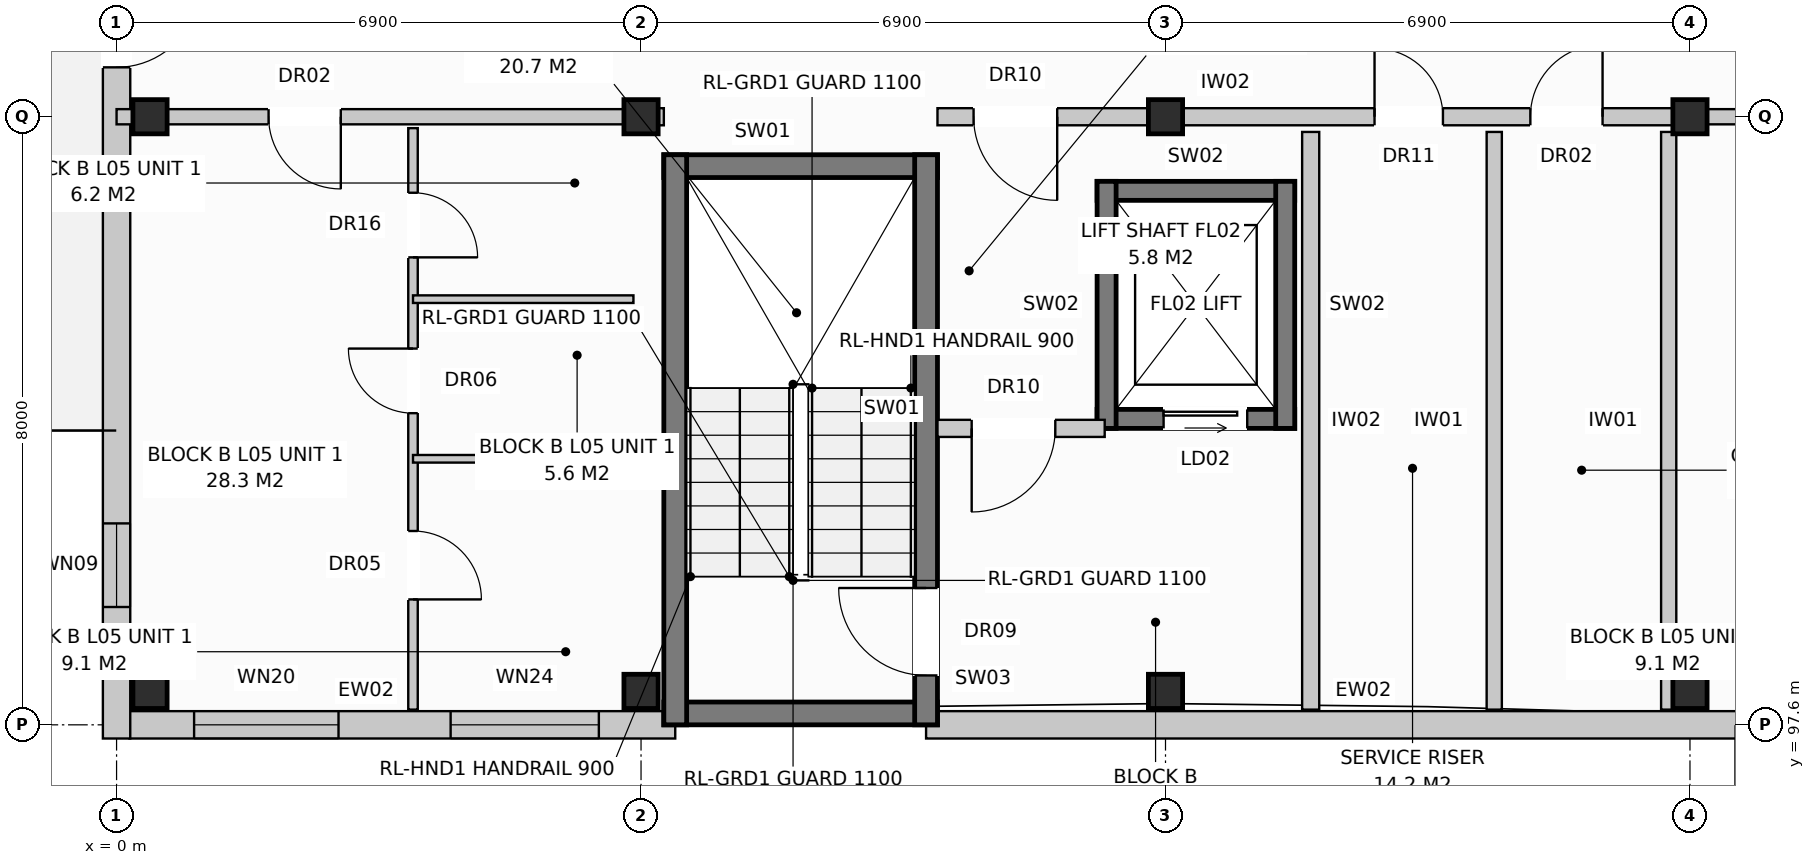
"""IFC4 building model, lengths in metres.
Left out: names, types, materials, properties, quantities, classifications, styles, units other than length and angle.
Written with IfcOpenShell. Run it as: python <this file> out.ifc"""

import sys

from ifc_helpers import new_model, si_unit, direction, frame, frame_2d, origin, origin_with_axes, origin_2d, place, context, subcontext, project, spatial, rectangle, extrude, element, fill, save


model = new_model("IFC4")
c1 = context("Model", 3, precision=1e-05, world=origin(), true_north=direction((0.0, 1.0)))
c2 = subcontext(c1, "Body", "Model", "MODEL_VIEW")
j1 = project(units=[si_unit("LENGTHUNIT", "METRE"), si_unit("PLANEANGLEUNIT", "RADIAN")], contexts=[c1])
p1 = place(None, origin())
s1 = spatial("IfcSite", under=j1, at=p1, CompositionType="ELEMENT")
p2 = place(p1, origin())
s2 = spatial("IfcBuilding", under=s1, at=p2, CompositionType="ELEMENT")
p3 = place(p2, frame((0.0, 0.0, 17.6)))
s3 = spatial("IfcBuildingStorey", under=s2, at=p3, CompositionType="ELEMENT", Elevation=17.6)
for number, where, z_axis, x_axis in (
    (1, (0.44, 98.04, 0.0), (0.0, 0.0, 1.0), (1.0, 0.0, 0.0)),
    (2, (0.44, 105.6, 0.0), (0.0, 0.0, 1.0), (1.0, 0.0, 0.0)),
    (3, (6.9, 98.04, 0.0), (0.0, 0.0, 1.0), (1.0, 0.0, 0.0)),
    (4, (6.9, 105.6, 0.0), (0.0, 0.0, 1.0), (1.0, 0.0, 0.0)),
    (5, (13.8, 98.04, 0.0), (0.0, 0.0, 1.0), (1.0, 0.0, 0.0)),
    (6, (13.8, 105.6, 0.0), (0.0, 0.0, 1.0), (1.0, 0.0, 0.0)),
    (7, (20.7, 98.04, 0.0), (0.0, 0.0, 1.0), (1.0, 0.0, 0.0)),
    (8, (20.7, 105.6, 0.0), (0.0, 0.0, 1.0), (1.0, 0.0, 0.0)),
):
    element("IfcColumn", number, at=place(p3, frame(where, z_axis=z_axis, x_axis=x_axis)), inside=s3, PredefinedType="COLUMN", context=c2, shape_type="SweptSolid", body=[
        extrude(rectangle(XDim=0.45, YDim=0.45, at=origin_2d()), origin(), (0.0, 0.0, 1.0), 3.2),
    ])
p4 = place(p3, frame((0.17, 97.6, 0.0), z_axis=(0.0, 0.0, 1.0), x_axis=(1.0, 0.0, 0.0)))
e9 = element("IfcWall", 9, at=p4, inside=s3, PredefinedType="STANDARD", context=c2, shape_type="SweptSolid", body=[
    extrude(rectangle(XDim=7.18, YDim=0.36, at=frame_2d((3.59, 0.0))), origin(), (0.0, 0.0, 1.0), 2.95),
])
p5 = place(p4, frame((0.85, 0.0, 0.8)))
e10 = element("IfcOpeningElement", 10, at=p5, cuts=e9, PredefinedType="OPENING", context=c2, shape_type="SweptSolid", body=[
    extrude(rectangle(XDim=1.9, YDim=1.85, at=frame_2d((0.95, 0.925))), frame((0.0, 0.192, 0.0), z_axis=(0.0, -1.0, 0.0), x_axis=(1.0, 0.0, 0.0)), (0.0, 0.0, 1.0), 0.384),
])
p6 = place(p4, frame((4.225, 0.0, 0.8)))
e11 = element("IfcOpeningElement", 11, at=p6, cuts=e9, PredefinedType="OPENING", context=c2, shape_type="SweptSolid", body=[
    extrude(rectangle(XDim=1.95, YDim=1.65, at=frame_2d((0.975, 0.825))), frame((0.0, 0.192, 0.0), z_axis=(0.0, -1.0, 0.0), x_axis=(1.0, 0.0, 0.0)), (0.0, 0.0, 1.0), 0.384),
])
p7 = place(p3, frame((10.65, 97.6, 0.0), z_axis=(0.0, 0.0, 1.0), x_axis=(1.0, 0.0, 0.0)))
e12 = element("IfcWall", 12, at=p7, inside=s3, PredefinedType="STANDARD", context=c2, shape_type="SweptSolid", body=[
    extrude(rectangle(XDim=17.4, YDim=0.36, at=frame_2d((8.7, 0.0))), origin(), (0.0, 0.0, 1.0), 2.95),
])
p8 = place(p7, frame((11.82, 0.0, 0.0)))
e13 = element("IfcOpeningElement", 13, at=p8, cuts=e12, PredefinedType="OPENING", context=c2, shape_type="SweptSolid", body=[
    extrude(rectangle(XDim=1.05, YDim=2.12, at=frame_2d((0.525, 1.06))), frame((0.0, 0.192, 0.0), z_axis=(0.0, -1.0, 0.0), x_axis=(1.0, 0.0, 0.0)), (0.0, 0.0, 1.0), 0.384),
])
p9 = place(p7, frame((14.87, 0.0, 0.72)))
e14 = element("IfcOpeningElement", 14, at=p9, cuts=e12, PredefinedType="OPENING", context=c2, shape_type="SweptSolid", body=[
    extrude(rectangle(XDim=1.1, YDim=1.5, at=frame_2d((0.55, 0.75))), frame((0.0, 0.192, 0.0), z_axis=(0.0, -1.0, 0.0), x_axis=(1.0, 0.0, 0.0)), (0.0, 0.0, 1.0), 0.384),
])
p10 = place(p3, frame((0.0, 97.42, 0.0), z_axis=(0.0, 0.0, 1.0), x_axis=(0.0, 1.0, 0.0)))
e15 = element("IfcWall", 15, at=p10, inside=s3, PredefinedType="STANDARD", context=c2, shape_type="SweptSolid", body=[
    extrude(rectangle(XDim=18.76, YDim=0.36, at=frame_2d((9.38, 0.0))), origin(), (0.0, 0.0, 1.0), 2.95),
])
p11 = place(p10, frame((8.83, 0.0, 0.0)))
e16 = element("IfcOpeningElement", 16, at=p11, cuts=e15, PredefinedType="OPENING", context=c2, shape_type="SweptSolid", body=[
    extrude(rectangle(XDim=1.1, YDim=2.1, at=frame_2d((0.55, 1.05))), frame((0.0, 0.192, 0.0), z_axis=(0.0, -1.0, 0.0), x_axis=(1.0, 0.0, 0.0)), (0.0, 0.0, 1.0), 0.384),
])
p12 = place(p10, frame((1.73, 0.0, 0.72)))
e17 = element("IfcOpeningElement", 17, at=p12, cuts=e15, PredefinedType="OPENING", context=c2, shape_type="SweptSolid", body=[
    extrude(rectangle(XDim=1.1, YDim=1.5, at=frame_2d((0.55, 0.75))), frame((0.0, 0.192, 0.0), z_axis=(0.0, -1.0, 0.0), x_axis=(1.0, 0.0, 0.0)), (0.0, 0.0, 1.0), 0.384),
])
p13 = place(p10, frame((15.93, 0.0, 0.72)))
e18 = element("IfcOpeningElement", 18, at=p13, cuts=e15, PredefinedType="OPENING", context=c2, shape_type="SweptSolid", body=[
    extrude(rectangle(XDim=1.1, YDim=1.5, at=frame_2d((0.55, 0.75))), frame((0.0, 0.192, 0.0), z_axis=(0.0, -1.0, 0.0), x_axis=(1.0, 0.0, 0.0)), (0.0, 0.0, 1.0), 0.384),
])
for number, where, z_axis, x_axis in (
    (19, (7.2, 97.75, 0.0), (0.0, 0.0, 1.0), (1.0, 0.0, 0.0)),
    (20, (7.2, 104.95, 0.0), (0.0, 0.0, 1.0), (1.0, 0.0, 0.0)),
):
    element("IfcWall", number, at=place(p3, frame(where, z_axis=z_axis, x_axis=x_axis)), inside=s3, PredefinedType="SHEAR", context=c2, shape_type="SweptSolid", body=[
        extrude(rectangle(XDim=3.6, YDim=0.3, at=frame_2d((1.8, 0.0))), origin(), (0.0, 0.0, 1.0), 2.95),
    ])
p14 = place(p3, frame((7.35, 97.6, 0.0), z_axis=(0.0, 0.0, 1.0), x_axis=(0.0, 1.0, 0.0)))
e21 = element("IfcWall", 21, at=p14, inside=s3, PredefinedType="SHEAR", context=c2, shape_type="SweptSolid", body=[
    extrude(rectangle(XDim=7.5, YDim=0.3, at=frame_2d((3.75, 0.0))), origin(), (0.0, 0.0, 1.0), 2.95),
])
p15 = place(p3, frame((10.65, 97.6, 0.0), z_axis=(0.0, 0.0, 1.0), x_axis=(0.0, 1.0, 0.0)))
e22 = element("IfcWall", 22, at=p15, inside=s3, PredefinedType="SHEAR", context=c2, shape_type="SweptSolid", body=[
    extrude(rectangle(XDim=7.5, YDim=0.3, at=frame_2d((3.75, 0.0))), origin(), (0.0, 0.0, 1.0), 2.95),
])
p16 = place(p15, frame((0.65, 0.0, 0.0)))
e23 = element("IfcOpeningElement", 23, at=p16, cuts=e22, PredefinedType="OPENING", context=c2, shape_type="SweptSolid", body=[
    extrude(rectangle(XDim=1.15, YDim=2.15, at=frame_2d((0.575, 1.075))), frame((0.0, 0.162, 0.0), z_axis=(0.0, -1.0, 0.0), x_axis=(1.0, 0.0, 0.0)), (0.0, 0.0, 1.0), 0.324),
])
p17 = place(p3, frame((12.9, 101.625, 0.0), z_axis=(0.0, 0.0, 1.0), x_axis=(1.0, 0.0, 0.0)))
e24 = element("IfcWall", 24, at=p17, inside=s3, PredefinedType="SHEAR", context=c2, shape_type="SweptSolid", body=[
    extrude(rectangle(XDim=2.6, YDim=0.25, at=frame_2d((1.3, 0.0))), origin(), (0.0, 0.0, 1.0), 2.95),
])
p18 = place(p17, frame((0.875, 0.0, 0.0)))
e25 = element("IfcOpeningElement", 25, at=p18, cuts=e24, PredefinedType="OPENING", context=c2, shape_type="SweptSolid", body=[
    extrude(rectangle(XDim=1.1, YDim=2.1, at=frame_2d((0.55, 1.05))), frame((0.0, 0.137, 0.0), z_axis=(0.0, -1.0, 0.0), x_axis=(1.0, 0.0, 0.0)), (0.0, 0.0, 1.0), 0.274),
])
p19 = place(p3, frame((12.9, 104.625, 0.0), z_axis=(0.0, 0.0, 1.0), x_axis=(1.0, 0.0, 0.0)))
e26 = element("IfcWall", 26, at=p19, inside=s3, PredefinedType="SHEAR", context=c2, shape_type="SweptSolid", body=[
    extrude(rectangle(XDim=2.6, YDim=0.25, at=frame_2d((1.3, 0.0))), origin(), (0.0, 0.0, 1.0), 2.95),
])
for number, where, z_axis, x_axis in (
    (27, (13.025, 101.5, 0.0), (0.0, 0.0, 1.0), (0.0, 1.0, 0.0)),
    (28, (15.375, 101.5, 0.0), (0.0, 0.0, 1.0), (0.0, 1.0, 0.0)),
):
    element("IfcWall", number, at=place(p3, frame(where, z_axis=z_axis, x_axis=x_axis)), inside=s3, PredefinedType="SHEAR", context=c2, shape_type="SweptSolid", body=[
        extrude(rectangle(XDim=3.25, YDim=0.25, at=frame_2d((1.625, 0.0))), origin(), (0.0, 0.0, 1.0), 2.95),
    ])
p20 = place(p3, frame((15.71, 97.8, 0.0), z_axis=(0.0, 0.0, 1.0), x_axis=(0.0, 1.0, 0.0)))
e29 = element("IfcWall", 29, at=p20, inside=s3, PredefinedType="PARTITIONING", context=c2, shape_type="SweptSolid", body=[
    extrude(rectangle(XDim=7.6, YDim=0.225, at=frame_2d((3.8, 0.0))), origin(), (0.0, 0.0, 1.0), 2.59),
])
p21 = place(p3, frame((10.8, 101.5, 0.0), z_axis=(0.0, 0.0, 1.0), x_axis=(1.0, 0.0, 0.0)))
e30 = element("IfcWall", 30, at=p21, inside=s3, PredefinedType="PARTITIONING", context=c2, shape_type="SweptSolid", body=[
    extrude(rectangle(XDim=2.2, YDim=0.225, at=frame_2d((1.1, 0.0))), origin(), (0.0, 0.0, 1.0), 2.95),
])
p22 = place(p21, frame((0.45, 0.0, 0.0)))
e31 = element("IfcOpeningElement", 31, at=p22, cuts=e30, PredefinedType="OPENING", context=c2, shape_type="SweptSolid", body=[
    extrude(rectangle(XDim=1.1, YDim=2.15, at=frame_2d((0.55, 1.075))), frame((0.0, 0.125, 0.0), z_axis=(0.0, -1.0, 0.0), x_axis=(1.0, 0.0, 0.0)), (0.0, 0.0, 1.0), 0.249),
])
p23 = place(p3, frame((6.9, 105.6, 0.0), z_axis=(0.0, 0.0, 1.0), x_axis=(1.0, 0.0, 0.0)))
e32 = element("IfcWall", 32, at=p23, inside=s3, PredefinedType="PARTITIONING", context=c2, shape_type="SweptSolid", body=[
    extrude(rectangle(XDim=0.3, YDim=0.225, at=frame_2d((0.15, 0.0))), origin(), (0.0, 0.0, 1.0), 2.95),
])
for number, where, z_axis, x_axis in (
    (33, (18.125, 97.8, 0.0), (0.0, 0.0, 1.0), (0.0, 1.0, 0.0)),
    (34, (20.42, 97.8, 0.0), (0.0, 0.0, 1.0), (0.0, 1.0, 0.0)),
):
    element("IfcWall", number, at=place(p3, frame(where, z_axis=z_axis, x_axis=x_axis)), inside=s3, PredefinedType="PARTITIONING", context=c2, shape_type="SweptSolid", body=[
        extrude(rectangle(XDim=7.6, YDim=0.2, at=frame_2d((3.8, 0.0))), origin(), (0.0, 0.0, 1.0), 2.95),
    ])
p24 = place(p3, frame((10.8, 105.6, 0.0), z_axis=(0.0, 0.0, 1.0), x_axis=(1.0, 0.0, 0.0)))
e35 = element("IfcWall", 35, at=p24, inside=s3, PredefinedType="PARTITIONING", context=c2, shape_type="SweptSolid", body=[
    extrude(rectangle(XDim=9.9, YDim=0.225, at=frame_2d((4.95, 0.0))), origin(), (0.0, 0.0, 1.0), 2.39),
])
p25 = place(p24, frame((0.475, 0.0, 0.0)))
e36 = element("IfcOpeningElement", 36, at=p25, cuts=e35, PredefinedType="OPENING", context=c2, shape_type="SweptSolid", body=[
    extrude(rectangle(XDim=1.1, YDim=2.15, at=frame_2d((0.55, 1.075))), frame((0.0, 0.125, 0.0), z_axis=(0.0, -1.0, 0.0), x_axis=(1.0, 0.0, 0.0)), (0.0, 0.0, 1.0), 0.249),
])
p26 = place(p24, frame((5.75, 0.0, 0.0)))
e37 = element("IfcOpeningElement", 37, at=p26, cuts=e35, PredefinedType="OPENING", context=c2, shape_type="SweptSolid", body=[
    extrude(rectangle(XDim=0.9, YDim=2.1, at=frame_2d((0.45, 1.05))), frame((0.0, 0.125, 0.0), z_axis=(0.0, -1.0, 0.0), x_axis=(1.0, 0.0, 0.0)), (0.0, 0.0, 1.0), 0.249),
])
p27 = place(p24, frame((7.8, 0.0, 0.0)))
e38 = element("IfcOpeningElement", 38, at=p27, cuts=e35, PredefinedType="OPENING", context=c2, shape_type="SweptSolid", body=[
    extrude(rectangle(XDim=0.95, YDim=2.15, at=frame_2d((0.475, 1.075))), frame((0.0, 0.125, 0.0), z_axis=(0.0, -1.0, 0.0), x_axis=(1.0, 0.0, 0.0)), (0.0, 0.0, 1.0), 0.249),
])
p28 = place(p3, frame((0.0, 105.6, 0.0), z_axis=(0.0, 0.0, 1.0), x_axis=(1.0, 0.0, 0.0)))
e39 = element("IfcWall", 39, at=p28, inside=s3, PredefinedType="PARTITIONING", context=c2, shape_type="SweptSolid", body=[
    extrude(rectangle(XDim=6.9, YDim=0.2, at=frame_2d((3.45, 0.0))), origin(), (0.0, 0.0, 1.0), 2.39),
])
p29 = place(p28, frame((2.0, 0.0, 0.0)))
e40 = element("IfcOpeningElement", 40, at=p29, cuts=e39, PredefinedType="OPENING", context=c2, shape_type="SweptSolid", body=[
    extrude(rectangle(XDim=0.95, YDim=2.15, at=frame_2d((0.475, 1.075))), frame((0.0, 0.112, 0.0), z_axis=(0.0, -1.0, 0.0), x_axis=(1.0, 0.0, 0.0)), (0.0, 0.0, 1.0), 0.224),
])
p30 = place(p3, frame((3.9, 105.45, 0.0), z_axis=(0.0, 0.0, 1.0), x_axis=(0.0, -1.0, 0.0)))
e41 = element("IfcWall", 41, at=p30, inside=s3, PredefinedType="PARTITIONING", context=c2, shape_type="SweptSolid", body=[
    extrude(rectangle(XDim=7.65, YDim=0.125, at=frame_2d((3.825, 0.0))), origin(), (0.0, 0.0, 1.0), 2.95),
])
p31 = place(p30, frame((0.85, 0.0, 0.0)))
e42 = element("IfcOpeningElement", 42, at=p31, cuts=e41, PredefinedType="OPENING", context=c2, shape_type="SweptSolid", body=[
    extrude(rectangle(XDim=0.85, YDim=2.1, at=frame_2d((0.425, 1.05))), frame((0.0, 0.074, 0.0), z_axis=(0.0, -1.0, 0.0), x_axis=(1.0, 0.0, 0.0)), (0.0, 0.0, 1.0), 0.149),
])
p32 = place(p30, frame((2.9, 0.0, 0.0)))
e43 = element("IfcOpeningElement", 43, at=p32, cuts=e41, PredefinedType="OPENING", context=c2, shape_type="SweptSolid", body=[
    extrude(rectangle(XDim=0.85, YDim=2.05, at=frame_2d((0.425, 1.025))), frame((0.0, 0.074, 0.0), z_axis=(0.0, -1.0, 0.0), x_axis=(1.0, 0.0, 0.0)), (0.0, 0.0, 1.0), 0.149),
])
p33 = place(p30, frame((5.3, 0.0, 0.0)))
e44 = element("IfcOpeningElement", 44, at=p33, cuts=e41, PredefinedType="OPENING", context=c2, shape_type="SweptSolid", body=[
    extrude(rectangle(XDim=0.9, YDim=2.1, at=frame_2d((0.45, 1.05))), frame((0.0, 0.074, 0.0), z_axis=(0.0, -1.0, 0.0), x_axis=(1.0, 0.0, 0.0)), (0.0, 0.0, 1.0), 0.149),
])
for number, where, z_axis, x_axis in (
    (45, (3.9, 103.2, 0.0), (0.0, 0.0, 1.0), (1.0, 0.0, 0.0)),
    (46, (3.9, 101.1, 0.0), (0.0, 0.0, 1.0), (1.0, 0.0, 0.0)),
):
    element("IfcWall", number, at=place(p3, frame(where, z_axis=z_axis, x_axis=x_axis)), inside=s3, PredefinedType="PARTITIONING", context=c2, shape_type="SweptSolid", body=[
        extrude(rectangle(XDim=2.9, YDim=0.1, at=frame_2d((1.45, 0.0))), origin(), (0.0, 0.0, 1.0), 2.95),
    ])
p34 = place(p3, frame((20.7, 105.6, 0.0), z_axis=(0.0, 0.0, 1.0), x_axis=(1.0, 0.0, 0.0)))
e47 = element("IfcWall", 47, at=p34, inside=s3, PredefinedType="PARTITIONING", context=c2, shape_type="SweptSolid", body=[
    extrude(rectangle(XDim=6.9, YDim=0.2, at=frame_2d((3.45, 0.0))), origin(), (0.0, 0.0, 1.0), 2.39),
])
p35 = place(p34, frame((2.0, 0.0, 0.0)))
e48 = element("IfcOpeningElement", 48, at=p35, cuts=e47, PredefinedType="OPENING", context=c2, shape_type="SweptSolid", body=[
    extrude(rectangle(XDim=0.95, YDim=2.15, at=frame_2d((0.475, 1.075))), frame((0.0, 0.112, 0.0), z_axis=(0.0, -1.0, 0.0), x_axis=(1.0, 0.0, 0.0)), (0.0, 0.0, 1.0), 0.224),
])
p36 = place(p5, origin_with_axes())
e49 = element("IfcWindow", 49, at=p36, inside=s3, PartitioningType="SINGLE_PANEL", PredefinedType="WINDOW", context=c2, shape_type="SweptSolid", body=[
    extrude(rectangle(XDim=1.9, YDim=1.85, at=frame_2d((0.95, 0.925))), frame((0.0, 0.03, 0.0), z_axis=(0.0, -1.0, 0.0), x_axis=(1.0, 0.0, 0.0)), (0.0, 0.0, 1.0), 0.06),
])
fill(e10, e49)
p37 = place(p6, origin_with_axes())
e50 = element("IfcWindow", 50, at=p37, inside=s3, PartitioningType="SINGLE_PANEL", PredefinedType="WINDOW", context=c2, shape_type="SweptSolid", body=[
    extrude(rectangle(XDim=1.95, YDim=1.65, at=frame_2d((0.975, 0.825))), frame((0.0, 0.03, 0.0), z_axis=(0.0, -1.0, 0.0), x_axis=(1.0, 0.0, 0.0)), (0.0, 0.0, 1.0), 0.06),
])
fill(e11, e50)
p38 = place(p11, frame((1.1, 0.0, 0.0), z_axis=(0.0, 0.0, 1.0), x_axis=(-1.0, 0.0, 0.0)))
e51 = element("IfcDoor", 51, at=p38, inside=s3, OperationType="SINGLE_SWING_RIGHT", PredefinedType="DOOR", context=c2, shape_type="SweptSolid", body=[
    extrude(rectangle(XDim=1.1, YDim=2.1, at=frame_2d((0.55, 1.05))), frame((0.0, 0.025, 0.0), z_axis=(0.0, -1.0, 0.0), x_axis=(1.0, 0.0, 0.0)), (0.0, 0.0, 1.0), 0.05),
])
fill(e16, e51)
p39 = place(p12, origin_with_axes())
e52 = element("IfcWindow", 52, at=p39, inside=s3, PartitioningType="SINGLE_PANEL", PredefinedType="WINDOW", context=c2, shape_type="SweptSolid", body=[
    extrude(rectangle(XDim=1.1, YDim=1.5, at=frame_2d((0.55, 0.75))), frame((0.0, 0.03, 0.0), z_axis=(0.0, -1.0, 0.0), x_axis=(1.0, 0.0, 0.0)), (0.0, 0.0, 1.0), 0.06),
])
fill(e17, e52)
p40 = place(p16, origin_with_axes())
e53 = element("IfcDoor", 53, at=p40, inside=s3, OperationType="SINGLE_SWING_RIGHT", PredefinedType="DOOR", context=c2, shape_type="SweptSolid", body=[
    extrude(rectangle(XDim=1.15, YDim=2.15, at=frame_2d((0.575, 1.075))), frame((0.0, 0.025, 0.0), z_axis=(0.0, -1.0, 0.0), x_axis=(1.0, 0.0, 0.0)), (0.0, 0.0, 1.0), 0.05),
])
fill(e23, e53)
p41 = place(p18, origin_with_axes())
e54 = element("IfcDoor", 54, at=p41, inside=s3, OperationType="SLIDING_TO_LEFT", PredefinedType="DOOR", context=c2, shape_type="SweptSolid", body=[
    extrude(rectangle(XDim=1.1, YDim=2.1, at=frame_2d((0.55, 1.05))), frame((0.0, 0.025, 0.0), z_axis=(0.0, -1.0, 0.0), x_axis=(1.0, 0.0, 0.0)), (0.0, 0.0, 1.0), 0.05),
])
fill(e25, e54)
p42 = place(p22, frame((1.1, 0.0, 0.0), z_axis=(0.0, 0.0, 1.0), x_axis=(-1.0, 0.0, 0.0)))
e55 = element("IfcDoor", 55, at=p42, inside=s3, OperationType="SINGLE_SWING_LEFT", PredefinedType="DOOR", context=c2, shape_type="SweptSolid", body=[
    extrude(rectangle(XDim=1.1, YDim=2.15, at=frame_2d((0.55, 1.075))), frame((0.0, 0.025, 0.0), z_axis=(0.0, -1.0, 0.0), x_axis=(1.0, 0.0, 0.0)), (0.0, 0.0, 1.0), 0.05),
])
fill(e31, e55)
p43 = place(p25, frame((1.1, 0.0, 0.0), z_axis=(0.0, 0.0, 1.0), x_axis=(-1.0, 0.0, 0.0)))
e56 = element("IfcDoor", 56, at=p43, inside=s3, OperationType="SINGLE_SWING_RIGHT", PredefinedType="DOOR", context=c2, shape_type="SweptSolid", body=[
    extrude(rectangle(XDim=1.1, YDim=2.15, at=frame_2d((0.55, 1.075))), frame((0.0, 0.025, 0.0), z_axis=(0.0, -1.0, 0.0), x_axis=(1.0, 0.0, 0.0)), (0.0, 0.0, 1.0), 0.05),
])
fill(e36, e56)
p44 = place(p26, origin_with_axes())
e57 = element("IfcDoor", 57, at=p44, inside=s3, OperationType="SINGLE_SWING_LEFT", PredefinedType="DOOR", context=c2, shape_type="SweptSolid", body=[
    extrude(rectangle(XDim=0.9, YDim=2.1, at=frame_2d((0.45, 1.05))), frame((0.0, 0.025, 0.0), z_axis=(0.0, -1.0, 0.0), x_axis=(1.0, 0.0, 0.0)), (0.0, 0.0, 1.0), 0.05),
])
fill(e37, e57)
p45 = place(p27, origin_with_axes())
e58 = element("IfcDoor", 58, at=p45, inside=s3, OperationType="SINGLE_SWING_RIGHT", PredefinedType="DOOR", context=c2, shape_type="SweptSolid", body=[
    extrude(rectangle(XDim=0.95, YDim=2.15, at=frame_2d((0.475, 1.075))), frame((0.0, 0.025, 0.0), z_axis=(0.0, -1.0, 0.0), x_axis=(1.0, 0.0, 0.0)), (0.0, 0.0, 1.0), 0.05),
])
fill(e38, e58)
p46 = place(p29, frame((0.95, 0.0, 0.0), z_axis=(0.0, 0.0, 1.0), x_axis=(-1.0, 0.0, 0.0)))
e59 = element("IfcDoor", 59, at=p46, inside=s3, OperationType="SINGLE_SWING_RIGHT", PredefinedType="DOOR", context=c2, shape_type="SweptSolid", body=[
    extrude(rectangle(XDim=0.95, YDim=2.15, at=frame_2d((0.475, 1.075))), frame((0.0, 0.025, 0.0), z_axis=(0.0, -1.0, 0.0), x_axis=(1.0, 0.0, 0.0)), (0.0, 0.0, 1.0), 0.05),
])
fill(e40, e59)
p47 = place(p31, origin_with_axes())
e60 = element("IfcDoor", 60, at=p47, inside=s3, OperationType="SINGLE_SWING_RIGHT", PredefinedType="DOOR", context=c2, shape_type="SweptSolid", body=[
    extrude(rectangle(XDim=0.85, YDim=2.1, at=frame_2d((0.425, 1.05))), frame((0.0, 0.025, 0.0), z_axis=(0.0, -1.0, 0.0), x_axis=(1.0, 0.0, 0.0)), (0.0, 0.0, 1.0), 0.05),
])
fill(e42, e60)
p48 = place(p32, frame((0.85, 0.0, 0.0), z_axis=(0.0, 0.0, 1.0), x_axis=(-1.0, 0.0, 0.0)))
e61 = element("IfcDoor", 61, at=p48, inside=s3, OperationType="SINGLE_SWING_LEFT", PredefinedType="DOOR", context=c2, shape_type="SweptSolid", body=[
    extrude(rectangle(XDim=0.85, YDim=2.05, at=frame_2d((0.425, 1.025))), frame((0.0, 0.025, 0.0), z_axis=(0.0, -1.0, 0.0), x_axis=(1.0, 0.0, 0.0)), (0.0, 0.0, 1.0), 0.05),
])
fill(e43, e61)
p49 = place(p33, origin_with_axes())
e62 = element("IfcDoor", 62, at=p49, inside=s3, OperationType="SINGLE_SWING_RIGHT", PredefinedType="DOOR", context=c2, shape_type="SweptSolid", body=[
    extrude(rectangle(XDim=0.9, YDim=2.1, at=frame_2d((0.45, 1.05))), frame((0.0, 0.025, 0.0), z_axis=(0.0, -1.0, 0.0), x_axis=(1.0, 0.0, 0.0)), (0.0, 0.0, 1.0), 0.05),
])
fill(e44, e62)
save(model, sys.argv[1])
